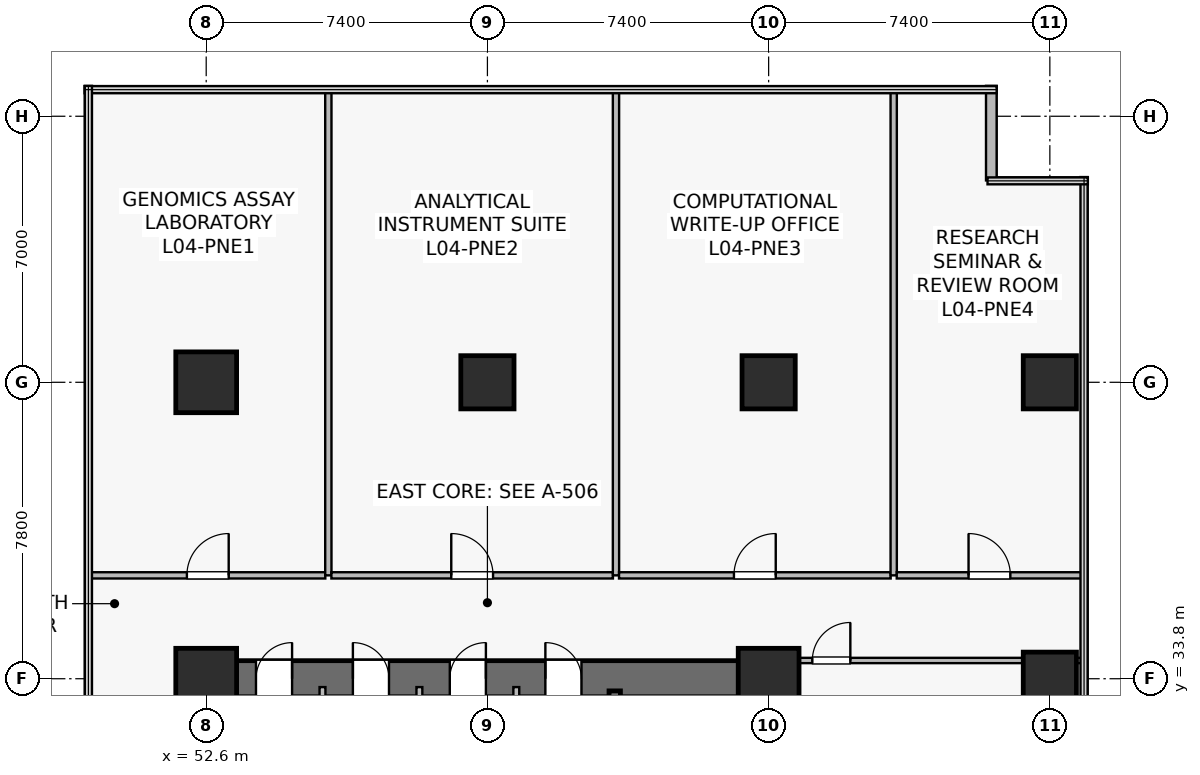
"""IFC4 building model, lengths in metres.
Left out: names, types, materials, properties, quantities, classifications, styles, units other than length and angle.
Written with IfcOpenShell. Run it as: python <this file> out.ifc"""

import sys

from ifc_helpers import new_model, si_unit, direction, frame, frame_2d, origin, origin_2d, place, context, subcontext, project, spatial, rectangle, extrude, source, transform, mapped, element, fill, save


model = new_model("IFC4")
c1 = context("Model", 3, precision=1e-05, world=origin(), true_north=direction((0.0, 1.0)))
c2 = subcontext(c1, "Body", "Model", "MODEL_VIEW")
j1 = project(units=[si_unit("LENGTHUNIT", "METRE"), si_unit("PLANEANGLEUNIT", "RADIAN")], contexts=[c1])
p1 = place(None, origin())
s1 = spatial("IfcSite", under=j1, at=p1, CompositionType="ELEMENT")
p2 = place(p1, origin())
s2 = spatial("IfcBuilding", under=s1, at=p2, CompositionType="ELEMENT")
p3 = place(p2, frame((0.0, 0.0, 15.0)))
s3 = spatial("IfcBuildingStorey", under=s2, at=p3, CompositionType="ELEMENT", Elevation=15.0)
p4 = place(p3, frame((52.125, 33.8, 0.0), z_axis=(0.0, 0.0, 1.0), x_axis=(1.0, 0.0, 0.0)))
e1 = element("IfcWall", 1, at=p4, inside=s3, PredefinedType="SHEAR", context=c2, shape_type="SweptSolid", body=[
    extrude(rectangle(XDim=15.75, YDim=0.95, at=frame_2d((7.875, 0.0))), origin(), (0.0, 0.0, 1.0), 4.45),
])
p5 = place(p4, frame((9.4, 0.0, 0.0)))
e2 = element("IfcOpeningElement", 2, at=p5, cuts=e1, PredefinedType="OPENING", context=c2, shape_type="SweptSolid", body=[
    extrude(rectangle(XDim=0.95, YDim=2.15, at=frame_2d((0.475, 1.075))), frame((0.0, 0.485, 0.0), z_axis=(0.0, -1.0, 0.0), x_axis=(1.0, 0.0, 0.0)), (0.0, 0.0, 1.0), 0.97),
])
p6 = place(p4, frame((6.885, 0.0, 0.0)))
e3 = element("IfcOpeningElement", 3, at=p6, cuts=e1, PredefinedType="OPENING", context=c2, shape_type="SweptSolid", body=[
    extrude(rectangle(XDim=0.95, YDim=2.15, at=frame_2d((0.475, 1.075))), frame((0.0, 0.485, 0.0), z_axis=(0.0, -1.0, 0.0), x_axis=(1.0, 0.0, 0.0)), (0.0, 0.0, 1.0), 0.97),
])
p7 = place(p4, frame((4.335, 0.0, 0.0)))
e4 = element("IfcOpeningElement", 4, at=p7, cuts=e1, PredefinedType="OPENING", context=c2, shape_type="SweptSolid", body=[
    extrude(rectangle(XDim=0.95, YDim=2.15, at=frame_2d((0.475, 1.075))), frame((0.0, 0.485, 0.0), z_axis=(0.0, -1.0, 0.0), x_axis=(1.0, 0.0, 0.0)), (0.0, 0.0, 1.0), 0.97),
])
p8 = place(p4, frame((1.785, 0.0, 0.0)))
e5 = element("IfcOpeningElement", 5, at=p8, cuts=e1, PredefinedType="OPENING", context=c2, shape_type="SweptSolid", body=[
    extrude(rectangle(XDim=0.95, YDim=2.15, at=frame_2d((0.475, 1.075))), frame((0.0, 0.485, 0.0), z_axis=(0.0, -1.0, 0.0), x_axis=(1.0, 0.0, 0.0)), (0.0, 0.0, 1.0), 0.97),
])
p9 = place(p3, frame((63.35, 24.85, 0.0), z_axis=(0.0, 0.0, 1.0), x_axis=(0.0, 1.0, 0.0)))
e6 = element("IfcWall", 6, at=p9, inside=s3, PredefinedType="SHEAR", context=c2, shape_type="SweptSolid", body=[
    extrude(rectangle(XDim=8.63, YDim=0.3, at=frame_2d((4.315, 0.0))), origin(), (0.0, 0.0, 1.0), 4.45),
])
p10 = place(p9, frame((0.42, 0.0, 0.0)))
e7 = element("IfcOpeningElement", 7, at=p10, cuts=e6, PredefinedType="OPENING", context=c2, shape_type="SweptSolid", body=[
    extrude(rectangle(XDim=1.1, YDim=2.15, at=frame_2d((0.55, 1.075))), frame((0.0, 0.16, 0.0), z_axis=(0.0, -1.0, 0.0), x_axis=(1.0, 0.0, 0.0)), (0.0, 0.0, 1.0), 0.32),
])
m1 = source(origin(), c2, "Body", "SweptSolid", [
    extrude(rectangle(XDim=1.6, YDim=1.6, at=origin_2d()), origin(), (0.0, 0.0, 1.0), 4.8),
])
for number, where, z_axis, x_axis in (
    (8, (52.6, 33.8, 0.0), (0.0, 0.0, 1.0), (1.0, 0.0, 0.0)),
    (9, (67.4, 33.8, 0.0), (0.0, 0.0, 1.0), (1.0, 0.0, 0.0)),
    (10, (52.6, 41.6, 0.0), (0.0, 0.0, 1.0), (1.0, 0.0, 0.0)),
):
    element("IfcColumn", number, at=place(p3, frame(where, z_axis=z_axis, x_axis=x_axis)), inside=s3, PredefinedType="COLUMN", context=c2, shape_type="MappedRepresentation", body=[
        mapped(m1, transform((0.0, 0.0, 0.0), scale=1.0)),
    ])
m2 = source(origin(), c2, "Body", "SweptSolid", [
    extrude(rectangle(XDim=1.4, YDim=1.4, at=origin_2d()), origin(), (0.0, 0.0, 1.0), 4.8),
])
for number, where, z_axis, x_axis in (
    (11, (60.0, 41.6, 0.0), (0.0, 0.0, 1.0), (1.0, 0.0, 0.0)),
    (12, (67.4, 41.6, 0.0), (0.0, 0.0, 1.0), (1.0, 0.0, 0.0)),
    (13, (74.8, 33.8, 0.0), (0.0, 0.0, 1.0), (1.0, 0.0, 0.0)),
    (14, (74.8, 41.6, 0.0), (0.0, 0.0, 1.0), (1.0, 0.0, 0.0)),
):
    element("IfcColumn", number, at=place(p3, frame(where, z_axis=z_axis, x_axis=x_axis)), inside=s3, PredefinedType="COLUMN", context=c2, shape_type="MappedRepresentation", body=[
        mapped(m2, transform((0.0, 0.0, 0.0), scale=1.0)),
    ])
p11 = place(p3, frame((73.26, 46.912, 0.0), z_axis=(0.0, 0.0, 1.0), x_axis=(0.0, 1.0, 0.0)))
e15 = element("IfcWall", 15, at=p11, inside=s3, PredefinedType="STANDARD", context=c2, shape_type="SweptSolid", body=[
    extrude(rectangle(XDim=2.488, YDim=0.28, at=frame_2d((1.244, 0.0))), origin(), (0.0, 0.0, 1.0), 4.45),
])
for number, where, z_axis, x_axis in (
    (16, (60.76, 29.65, 0.0), (0.0, 0.0, 1.0), (0.0, 1.0, 0.0)),
    (17, (58.21, 29.65, 0.0), (0.0, 0.0, 1.0), (0.0, 1.0, 0.0)),
    (18, (55.66, 29.65, 0.0), (0.0, 0.0, 1.0), (0.0, 1.0, 0.0)),
):
    element("IfcWall", number, at=place(p3, frame(where, z_axis=z_axis, x_axis=x_axis)), inside=s3, PredefinedType="PLUMBINGWALL", context=c2, shape_type="SweptSolid", body=[
        extrude(rectangle(XDim=3.93, YDim=0.155, at=frame_2d((1.965, 0.0))), origin(), (0.0, 0.0, 1.0), 4.45),
    ])
p12 = place(p3, frame((68.0, 34.28, 0.0), z_axis=(0.0, 0.0, 1.0), x_axis=(1.0, 0.0, 0.0)))
e19 = element("IfcWall", 19, at=p12, inside=s3, PredefinedType="PARTITIONING", context=c2, shape_type="SweptSolid", body=[
    extrude(rectangle(XDim=7.65, YDim=0.14, at=frame_2d((3.825, 0.0))), origin(), (0.0, 0.0, 1.0), 3.835),
])
p13 = place(p12, frame((0.55, 0.0, 0.0)))
e20 = element("IfcOpeningElement", 20, at=p13, cuts=e19, PredefinedType="OPENING", context=c2, shape_type="SweptSolid", body=[
    extrude(rectangle(XDim=1.0, YDim=2.15, at=frame_2d((0.5, 1.075))), frame((0.0, 0.08, 0.0), z_axis=(0.0, -1.0, 0.0), x_axis=(1.0, 0.0, 0.0)), (0.0, 0.0, 1.0), 0.16),
])
p14 = place(p3, frame((49.55, 36.52, 0.0), z_axis=(0.0, 0.0, 1.0), x_axis=(1.0, 0.0, 0.0)))
e21 = element("IfcWall", 21, at=p14, inside=s3, PredefinedType="PARTITIONING", context=c2, shape_type="SweptSolid", body=[
    extrude(rectangle(XDim=6.184, YDim=0.165, at=frame_2d((3.092, 0.0))), origin(), (0.0, 0.0, 1.0), 3.735),
])
p15 = place(p14, frame((2.542, 0.0, 0.0)))
e22 = element("IfcOpeningElement", 22, at=p15, cuts=e21, PredefinedType="OPENING", context=c2, shape_type="SweptSolid", body=[
    extrude(rectangle(XDim=1.1, YDim=2.18, at=frame_2d((0.55, 1.09))), frame((0.0, 0.093, 0.0), z_axis=(0.0, -1.0, 0.0), x_axis=(1.0, 0.0, 0.0)), (0.0, 0.0, 1.0), 0.185),
])
p16 = place(p3, frame((55.814, 36.52, 0.0), z_axis=(0.0, 0.0, 1.0), x_axis=(0.0, 1.0, 0.0)))
e23 = element("IfcWall", 23, at=p16, inside=s3, PredefinedType="PARTITIONING", context=c2, shape_type="SweptSolid", body=[
    extrude(rectangle(XDim=12.77, YDim=0.165, at=frame_2d((6.385, 0.0))), origin(), (0.0, 0.0, 1.0), 3.635),
])
p17 = place(p3, frame((55.894, 36.52, 0.0), z_axis=(0.0, 0.0, 1.0), x_axis=(1.0, 0.0, 0.0)))
e24 = element("IfcWall", 24, at=p17, inside=s3, PredefinedType="PARTITIONING", context=c2, shape_type="SweptSolid", body=[
    extrude(rectangle(XDim=7.409, YDim=0.165, at=frame_2d((3.705, 0.0))), origin(), (0.0, 0.0, 1.0), 3.735),
])
p18 = place(p17, frame((3.155, 0.0, 0.0)))
e25 = element("IfcOpeningElement", 25, at=p18, cuts=e24, PredefinedType="OPENING", context=c2, shape_type="SweptSolid", body=[
    extrude(rectangle(XDim=1.1, YDim=2.18, at=frame_2d((0.55, 1.09))), frame((0.0, 0.093, 0.0), z_axis=(0.0, -1.0, 0.0), x_axis=(1.0, 0.0, 0.0)), (0.0, 0.0, 1.0), 0.185),
])
p19 = place(p3, frame((63.383, 36.52, 0.0), z_axis=(0.0, 0.0, 1.0), x_axis=(0.0, 1.0, 0.0)))
e26 = element("IfcWall", 26, at=p19, inside=s3, PredefinedType="PARTITIONING", context=c2, shape_type="SweptSolid", body=[
    extrude(rectangle(XDim=12.77, YDim=0.165, at=frame_2d((6.385, 0.0))), origin(), (0.0, 0.0, 1.0), 3.635),
])
p20 = place(p3, frame((63.463, 36.52, 0.0), z_axis=(0.0, 0.0, 1.0), x_axis=(1.0, 0.0, 0.0)))
e27 = element("IfcWall", 27, at=p20, inside=s3, PredefinedType="PARTITIONING", context=c2, shape_type="SweptSolid", body=[
    extrude(rectangle(XDim=7.148, YDim=0.165, at=frame_2d((3.574, 0.0))), origin(), (0.0, 0.0, 1.0), 3.735),
])
p21 = place(p20, frame((3.024, 0.0, 0.0)))
e28 = element("IfcOpeningElement", 28, at=p21, cuts=e27, PredefinedType="OPENING", context=c2, shape_type="SweptSolid", body=[
    extrude(rectangle(XDim=1.1, YDim=2.18, at=frame_2d((0.55, 1.09))), frame((0.0, 0.093, 0.0), z_axis=(0.0, -1.0, 0.0), x_axis=(1.0, 0.0, 0.0)), (0.0, 0.0, 1.0), 0.185),
])
p22 = place(p3, frame((70.691, 36.52, 0.0), z_axis=(0.0, 0.0, 1.0), x_axis=(0.0, 1.0, 0.0)))
e29 = element("IfcWall", 29, at=p22, inside=s3, PredefinedType="PARTITIONING", context=c2, shape_type="SweptSolid", body=[
    extrude(rectangle(XDim=12.77, YDim=0.165, at=frame_2d((6.385, 0.0))), origin(), (0.0, 0.0, 1.0), 3.635),
])
p23 = place(p3, frame((70.771, 36.52, 0.0), z_axis=(0.0, 0.0, 1.0), x_axis=(1.0, 0.0, 0.0)))
e30 = element("IfcWall", 30, at=p23, inside=s3, PredefinedType="PARTITIONING", context=c2, shape_type="SweptSolid", body=[
    extrude(rectangle(XDim=4.879, YDim=0.165, at=frame_2d((2.439, 0.0))), origin(), (0.0, 0.0, 1.0), 3.835),
])
p24 = place(p23, frame((1.889, 0.0, 0.0)))
e31 = element("IfcOpeningElement", 31, at=p24, cuts=e30, PredefinedType="OPENING", context=c2, shape_type="SweptSolid", body=[
    extrude(rectangle(XDim=1.1, YDim=2.18, at=frame_2d((0.55, 1.09))), frame((0.0, 0.093, 0.0), z_axis=(0.0, -1.0, 0.0), x_axis=(1.0, 0.0, 0.0)), (0.0, 0.0, 1.0), 0.185),
])
m3 = source(origin(), c2, "Body", "SweptSolid", [
    extrude(rectangle(XDim=0.95, YDim=2.15, at=frame_2d((0.475, 1.075))), frame((0.0, 0.025, 0.0), z_axis=(0.0, -1.0, 0.0), x_axis=(1.0, 0.0, 0.0)), (0.0, 0.0, 1.0), 0.05),
])
p25 = place(p5, origin())
e32 = element("IfcDoor", 32, at=p25, inside=s3, OperationType="SINGLE_SWING_LEFT", PredefinedType="DOOR", context=c2, shape_type="MappedRepresentation", body=[
    mapped(m3, transform((0.0, 0.0, 0.0), scale=1.0)),
])
fill(e2, e32)
p26 = place(p6, origin())
e33 = element("IfcDoor", 33, at=p26, inside=s3, OperationType="SINGLE_SWING_RIGHT", PredefinedType="DOOR", context=c2, shape_type="MappedRepresentation", body=[
    mapped(m3, transform((0.0, 0.0, 0.0), scale=1.0)),
])
fill(e3, e33)
p27 = place(p7, origin())
e34 = element("IfcDoor", 34, at=p27, inside=s3, OperationType="SINGLE_SWING_LEFT", PredefinedType="DOOR", context=c2, shape_type="MappedRepresentation", body=[
    mapped(m3, transform((0.0, 0.0, 0.0), scale=1.0)),
])
fill(e4, e34)
p28 = place(p8, origin())
e35 = element("IfcDoor", 35, at=p28, inside=s3, OperationType="SINGLE_SWING_RIGHT", PredefinedType="DOOR", context=c2, shape_type="MappedRepresentation", body=[
    mapped(m3, transform((0.0, 0.0, 0.0), scale=1.0)),
])
fill(e5, e35)
m4 = source(origin(), c2, "Body", "SweptSolid", [
    extrude(rectangle(XDim=1.0, YDim=2.15, at=frame_2d((0.5, 1.075))), frame((0.0, 0.025, 0.0), z_axis=(0.0, -1.0, 0.0), x_axis=(1.0, 0.0, 0.0)), (0.0, 0.0, 1.0), 0.05),
])
p29 = place(p13, origin())
e36 = element("IfcDoor", 36, at=p29, inside=s3, OperationType="SINGLE_SWING_RIGHT", PredefinedType="DOOR", context=c2, shape_type="MappedRepresentation", body=[
    mapped(m4, transform((0.0, 0.0, 0.0), scale=1.0)),
])
fill(e20, e36)
m5 = source(origin(), c2, "Body", "SweptSolid", [
    extrude(rectangle(XDim=1.1, YDim=2.18, at=frame_2d((0.55, 1.09))), frame((0.0, 0.025, 0.0), z_axis=(0.0, -1.0, 0.0), x_axis=(1.0, 0.0, 0.0)), (0.0, 0.0, 1.0), 0.05),
])
p30 = place(p15, origin())
e37 = element("IfcDoor", 37, at=p30, inside=s3, OperationType="SINGLE_SWING_RIGHT", PredefinedType="DOOR", context=c2, shape_type="MappedRepresentation", body=[
    mapped(m5, transform((0.0, 0.0, 0.0), scale=1.0)),
])
fill(e22, e37)
p31 = place(p18, origin())
e38 = element("IfcDoor", 38, at=p31, inside=s3, OperationType="SINGLE_SWING_LEFT", PredefinedType="DOOR", context=c2, shape_type="MappedRepresentation", body=[
    mapped(m5, transform((0.0, 0.0, 0.0), scale=1.0)),
])
fill(e25, e38)
p32 = place(p21, origin())
e39 = element("IfcDoor", 39, at=p32, inside=s3, OperationType="SINGLE_SWING_RIGHT", PredefinedType="DOOR", context=c2, shape_type="MappedRepresentation", body=[
    mapped(m5, transform((0.0, 0.0, 0.0), scale=1.0)),
])
fill(e28, e39)
p33 = place(p24, origin())
e40 = element("IfcDoor", 40, at=p33, inside=s3, OperationType="SINGLE_SWING_LEFT", PredefinedType="DOOR", context=c2, shape_type="MappedRepresentation", body=[
    mapped(m5, transform((0.0, 0.0, 0.0), scale=1.0)),
])
fill(e31, e40)
save(model, sys.argv[1])
